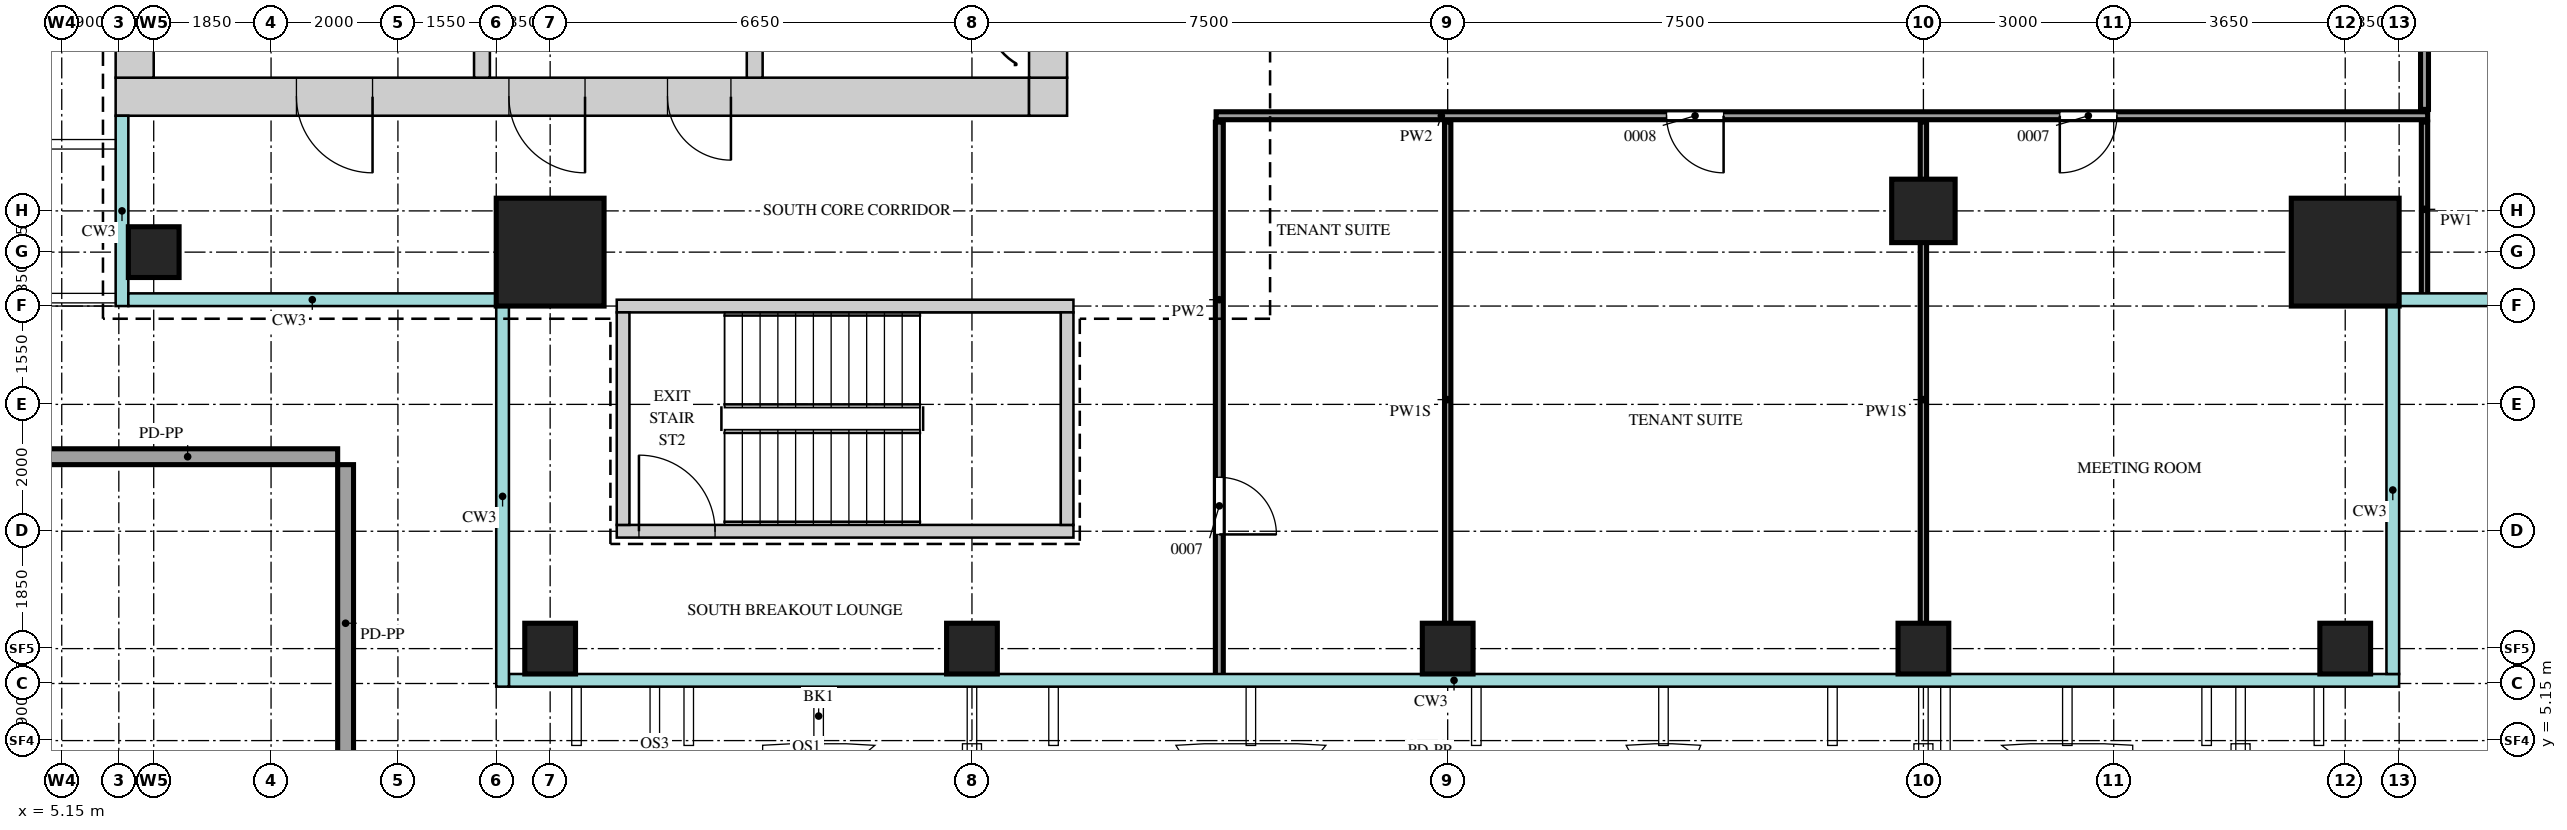
"""IFC4 building model, lengths in metres.
Left out: names, types, materials, properties, quantities, classifications, styles, units other than length and angle.
Written with IfcOpenShell. Run it as: python <this file> out.ifc"""

import sys

from ifc_helpers import new_model, si_unit, direction, frame, frame_2d, origin, origin_2d, place, context, subcontext, project, spatial, rectangle, extrude, source, transform, mapped, element, fill, save


model = new_model("IFC4")
c1 = context("Model", 3, precision=1e-05, world=origin(), true_north=direction((0.0, 1.0)))
c2 = subcontext(c1, "Body", "Model", "MODEL_VIEW")
j1 = project(units=[si_unit("LENGTHUNIT", "METRE"), si_unit("PLANEANGLEUNIT", "RADIAN")], contexts=[c1])
p1 = place(None, origin())
s1 = spatial("IfcSite", under=j1, at=p1, CompositionType="ELEMENT")
p2 = place(p1, origin())
s2 = spatial("IfcBuilding", under=s1, at=p2, CompositionType="ELEMENT")
p3 = place(p2, frame((0.0, 0.0, 282.2)))
s3 = spatial("IfcBuildingStorey", under=s2, at=p3, CompositionType="ELEMENT", Elevation=282.2)
m1 = source(origin(), c2, "Body", "SweptSolid", [
    extrude(rectangle(XDim=14.4, YDim=0.6, at=frame_2d((7.2, 0.0))), origin(), (0.0, 0.0, 1.0), 3.75),
])
p4 = place(p3, frame((6.0, 15.3, 0.0), z_axis=(0.0, 0.0, 1.0), x_axis=(1.0, 0.0, 0.0)))
e1 = element("IfcWall", 1, at=p4, inside=s3, PredefinedType="SHEAR", context=c2, shape_type="MappedRepresentation", body=[
    mapped(m1, transform((0.0, 0.0, 0.0))),
])
m2 = source(origin(), c2, "Body", "SweptSolid", [
    extrude(rectangle(XDim=1.2, YDim=2.1, at=frame_2d((0.6, 1.05))), frame((0.0, 0.31, 0.0), z_axis=(0.0, -1.0, 0.0), x_axis=(1.0, 0.0, 0.0)), (0.0, 0.0, 1.0), 0.62),
])
p5 = place(p4, frame((6.2, 0.0, 0.0)))
e2 = element("IfcOpeningElement", 2, at=p5, cuts=e1, PredefinedType="OPENING", context=c2, shape_type="MappedRepresentation", body=[
    mapped(m2, transform((0.0, 0.0, 0.0))),
])
p6 = place(p4, frame((2.85, 0.0, 0.0)))
e3 = element("IfcOpeningElement", 3, at=p6, cuts=e1, PredefinedType="OPENING", context=c2, shape_type="MappedRepresentation", body=[
    mapped(m2, transform((0.0, 0.0, 0.0))),
])
m3 = source(origin(), c2, "Body", "SweptSolid", [
    extrude(rectangle(XDim=1.0, YDim=2.1, at=frame_2d((0.5, 1.05))), frame((0.0, 0.31, 0.0), z_axis=(0.0, -1.0, 0.0), x_axis=(1.0, 0.0, 0.0)), (0.0, 0.0, 1.0), 0.62),
])
p7 = place(p4, frame((8.7, 0.0, 0.0)))
e4 = element("IfcOpeningElement", 4, at=p7, cuts=e1, PredefinedType="OPENING", context=c2, shape_type="MappedRepresentation", body=[
    mapped(m3, transform((0.0, 0.0, 0.0))),
])
m4 = source(origin(), c2, "Body", "SweptSolid", [
    extrude(rectangle(XDim=0.6, YDim=0.6, at=frame_2d((0.3, 0.0))), origin(), (0.0, 0.0, 1.0), 3.75),
])
p8 = place(p3, frame((20.4, 15.3, 0.0), z_axis=(0.0, 0.0, 1.0), x_axis=(1.0, 0.0, 0.0)))
e5 = element("IfcWall", 5, at=p8, inside=s3, PredefinedType="SHEAR", context=c2, shape_type="MappedRepresentation", body=[
    mapped(m4, transform((0.0, 0.0, 0.0))),
])
m5 = source(origin(), c2, "Body", "SweptSolid", [
    extrude(rectangle(XDim=22.8, YDim=0.6, at=frame_2d((11.4, 0.0))), origin(), (0.0, 0.0, 1.0), 3.75),
])
p9 = place(p3, frame((20.7, 15.6, 0.0), z_axis=(0.0, 0.0, 1.0), x_axis=(0.0, 1.0, 0.0)))
e6 = element("IfcWall", 6, at=p9, inside=s3, PredefinedType="SHEAR", context=c2, shape_type="MappedRepresentation", body=[
    mapped(m5, transform((0.0, 0.0, 0.0))),
])
m6 = source(origin(), c2, "Body", "SweptSolid", [
    extrude(rectangle(XDim=1.8, YDim=2.1, at=frame_2d((0.9, 1.05))), frame((0.0, 0.31, 0.0), z_axis=(0.0, -1.0, 0.0), x_axis=(1.0, 0.0, 0.0)), (0.0, 0.0, 1.0), 0.62),
])
p10 = place(p9, frame((10.9, 0.0, 0.0)))
e7 = element("IfcOpeningElement", 7, at=p10, cuts=e6, PredefinedType="OPENING", context=c2, shape_type="MappedRepresentation", body=[
    mapped(m6, transform((0.0, 0.0, 0.0))),
])
m7 = source(origin(), c2, "Body", "SweptSolid", [
    extrude(rectangle(XDim=0.9, YDim=2.1, at=frame_2d((0.45, 1.05))), frame((0.0, 0.31, 0.0), z_axis=(0.0, -1.0, 0.0), x_axis=(1.0, 0.0, 0.0)), (0.0, 0.0, 1.0), 0.62),
])
p11 = place(p9, frame((0.55, 0.0, 0.0)))
e8 = element("IfcOpeningElement", 8, at=p11, cuts=e6, PredefinedType="OPENING", context=c2, shape_type="MappedRepresentation", body=[
    mapped(m7, transform((0.0, 0.0, 0.0))),
])
p12 = place(p9, frame((2.3, 0.0, 0.0)))
e9 = element("IfcOpeningElement", 9, at=p12, cuts=e6, PredefinedType="OPENING", context=c2, shape_type="MappedRepresentation", body=[
    mapped(m3, transform((0.0, 0.0, 0.0))),
])
p13 = place(p9, frame((5.1, 0.0, 0.0)))
e10 = element("IfcOpeningElement", 10, at=p13, cuts=e6, PredefinedType="OPENING", context=c2, shape_type="MappedRepresentation", body=[
    mapped(m7, transform((0.0, 0.0, 0.0))),
])
p14 = place(p3, frame((6.3, 15.6, 0.0), z_axis=(0.0, 0.0, 1.0), x_axis=(0.0, 1.0, 0.0)))
e11 = element("IfcWall", 11, at=p14, inside=s3, PredefinedType="SHEAR", context=c2, shape_type="MappedRepresentation", body=[
    mapped(m5, transform((0.0, 0.0, 0.0))),
])
m8 = source(origin(), c2, "Body", "SweptSolid", [
    extrude(rectangle(XDim=7.2, YDim=0.2, at=frame_2d((3.6, 0.0))), origin(), (0.0, 0.0, 1.0), 3.75),
])
p15 = place(p3, frame((13.9, 12.0, 0.0), z_axis=(0.0, 0.0, 1.0), x_axis=(1.0, 0.0, 0.0)))
e12 = element("IfcWall", 12, at=p15, inside=s3, PredefinedType="SHEAR", context=c2, shape_type="MappedRepresentation", body=[
    mapped(m8, transform((0.0, 0.0, 0.0))),
])
p16 = place(p3, frame((13.9, 8.45, 0.0), z_axis=(0.0, 0.0, 1.0), x_axis=(1.0, 0.0, 0.0)))
e13 = element("IfcWall", 13, at=p16, inside=s3, PredefinedType="SHEAR", context=c2, shape_type="MappedRepresentation", body=[
    mapped(m8, transform((0.0, 0.0, 0.0))),
])
m9 = source(origin(), c2, "Body", "SweptSolid", [
    extrude(rectangle(XDim=1.2, YDim=2.1, at=frame_2d((0.6, 1.05))), frame((0.0, 0.11, 0.0), z_axis=(0.0, -1.0, 0.0), x_axis=(1.0, 0.0, 0.0)), (0.0, 0.0, 1.0), 0.22),
])
p17 = place(p16, frame((0.35, 0.0, 0.0)))
e14 = element("IfcOpeningElement", 14, at=p17, cuts=e13, PredefinedType="OPENING", context=c2, shape_type="MappedRepresentation", body=[
    mapped(m9, transform((0.0, 0.0, 0.0))),
])
m10 = source(origin(), c2, "Body", "SweptSolid", [
    extrude(rectangle(XDim=3.35, YDim=0.2, at=frame_2d((1.675, 0.0))), origin(), (0.0, 0.0, 1.0), 3.75),
])
for number, where, z_axis, x_axis in (
    (15, (21.0, 8.55, 0.0), (0.0, 0.0, 1.0), (0.0, 1.0, 0.0)),
    (16, (14.0, 8.55, 0.0), (0.0, 0.0, 1.0), (0.0, 1.0, 0.0)),
):
    element("IfcWall", number, at=place(p3, frame(where, z_axis=z_axis, x_axis=x_axis)), inside=s3, PredefinedType="SHEAR", context=c2, shape_type="MappedRepresentation", body=[
        mapped(m10, transform((0.0, 0.0, 0.0))),
    ])
m11 = source(origin(), c2, "Body", "SweptSolid", [
    extrude(rectangle(XDim=3.6, YDim=0.25, at=frame_2d((1.8, 0.0))), origin(), (0.0, 0.0, 1.0), 3.75),
])
for number, where, z_axis, x_axis in (
    (17, (16.075, 15.6, 0.0), (0.0, 0.0, 1.0), (0.0, 1.0, 0.0)),
    (18, (11.775, 15.6, 0.0), (0.0, 0.0, 1.0), (0.0, 1.0, 0.0)),
):
    element("IfcWall", number, at=place(p3, frame(where, z_axis=z_axis, x_axis=x_axis)), inside=s3, PredefinedType="STANDARD", context=c2, shape_type="MappedRepresentation", body=[
        mapped(m11, transform((0.0, 0.0, 0.0))),
    ])
m12 = source(origin(), c2, "Body", "SweptSolid", [
    extrude(rectangle(XDim=1.7, YDim=1.7, at=origin_2d()), origin(), (0.0, 0.0, 1.0), 3.75),
])
for number, where, z_axis, x_axis in (
    (19, (41.15, 12.85, 0.0), (0.0, 0.0, 1.0), (1.0, 0.0, 0.0)),
    (20, (12.85, 12.85, 0.0), (0.0, 0.0, 1.0), (1.0, 0.0, 0.0)),
):
    element("IfcColumn", number, at=place(p3, frame(where, z_axis=z_axis, x_axis=x_axis)), inside=s3, PredefinedType="COLUMN", context=c2, shape_type="MappedRepresentation", body=[
        mapped(m12, transform((0.0, 0.0, 0.0))),
    ])
m13 = source(origin(), c2, "Body", "SweptSolid", [
    extrude(rectangle(XDim=0.8, YDim=0.8, at=origin_2d()), origin(), (0.0, 0.0, 1.0), 3.75),
])
for number, where, z_axis, x_axis in (
    (21, (12.85, 6.6, 0.0), (0.0, 0.0, 1.0), (1.0, 0.0, 0.0)),
    (22, (19.5, 6.6, 0.0), (0.0, 0.0, 1.0), (1.0, 0.0, 0.0)),
    (23, (27.0, 6.6, 0.0), (0.0, 0.0, 1.0), (1.0, 0.0, 0.0)),
    (24, (34.5, 6.6, 0.0), (0.0, 0.0, 1.0), (1.0, 0.0, 0.0)),
    (25, (41.15, 6.6, 0.0), (0.0, 0.0, 1.0), (1.0, 0.0, 0.0)),
    (26, (6.6, 12.85, 0.0), (0.0, 0.0, 1.0), (1.0, 0.0, 0.0)),
):
    element("IfcColumn", number, at=place(p3, frame(where, z_axis=z_axis, x_axis=x_axis)), inside=s3, PredefinedType="COLUMN", context=c2, shape_type="MappedRepresentation", body=[
        mapped(m13, transform((0.0, 0.0, 0.0))),
    ])
m14 = source(origin(), c2, "Body", "SweptSolid", [
    extrude(rectangle(XDim=1.0, YDim=1.0, at=origin_2d()), origin(), (0.0, 0.0, 1.0), 3.75),
])
p18 = place(p3, frame((34.5, 13.5, 0.0), z_axis=(0.0, 0.0, 1.0), x_axis=(1.0, 0.0, 0.0)))
e27 = element("IfcColumn", 27, at=p18, inside=s3, PredefinedType="COLUMN", context=c2, shape_type="MappedRepresentation", body=[
    mapped(m14, transform((0.0, 0.0, 0.0))),
])
m15 = source(origin(), c2, "Body", "SweptSolid", [
    extrude(rectangle(XDim=5.0, YDim=0.25, at=frame_2d((2.5, 0.0))), origin(), (0.0, 0.0, 1.0), 1.1),
])
p19 = place(p3, frame((9.625, 9.5, 0.0), z_axis=(0.0, 0.0, 1.0), x_axis=(0.0, -1.0, 0.0)))
e28 = element("IfcWall", 28, at=p19, inside=s3, PredefinedType="SOLIDWALL", context=c2, shape_type="MappedRepresentation", body=[
    mapped(m15, transform((0.0, 0.0, 0.0))),
])
m16 = source(origin(), c2, "Body", "SweptSolid", [
    extrude(rectangle(XDim=4.73, YDim=0.25, at=frame_2d((2.365, 0.0))), origin(), (0.0, 0.0, 1.0), 1.1),
])
p20 = place(p3, frame((4.77, 9.625, 0.0), z_axis=(0.0, 0.0, 1.0), x_axis=(1.0, 0.0, 0.0)))
e29 = element("IfcWall", 29, at=p20, inside=s3, PredefinedType="SOLIDWALL", context=c2, shape_type="MappedRepresentation", body=[
    mapped(m16, transform((0.0, 0.0, 0.0))),
])
m17 = source(origin(), c2, "Body", "SweptSolid", [
    extrude(rectangle(XDim=8.75, YDim=0.125, at=frame_2d((4.375, 0.0))), origin(), (0.0, 0.0, 1.0), 3.8),
])
p21 = place(p3, frame((23.4, 6.15, 0.0), z_axis=(0.0, 0.0, 1.0), x_axis=(0.0, 1.0, 0.0)))
e30 = element("IfcWall", 30, at=p21, inside=s3, PredefinedType="PARTITIONING", context=c2, shape_type="MappedRepresentation", body=[
    mapped(m17, transform((0.0, 0.0, 0.0))),
])
m18 = source(origin(), c2, "Body", "SweptSolid", [
    extrude(rectangle(XDim=0.9, YDim=2.1, at=frame_2d((0.45, 1.05))), frame((0.0, 0.073, 0.0), z_axis=(0.0, -1.0, 0.0), x_axis=(1.0, 0.0, 0.0)), (0.0, 0.0, 1.0), 0.145),
])
p22 = place(p21, frame((2.25, 0.0, 0.0)))
e31 = element("IfcOpeningElement", 31, at=p22, cuts=e30, PredefinedType="OPENING", context=c2, shape_type="MappedRepresentation", body=[
    mapped(m18, transform((0.0, 0.0, 0.0))),
])
m19 = source(origin(), c2, "Body", "SweptSolid", [
    extrude(rectangle(XDim=8.75, YDim=0.1, at=frame_2d((4.375, 0.0))), origin(), (0.0, 0.0, 1.0), 3.35),
])
for number, where, z_axis, x_axis in (
    (32, (27.0, 6.15, 0.0), (0.0, 0.0, 1.0), (0.0, 1.0, 0.0)),
    (33, (34.5, 6.15, 0.0), (0.0, 0.0, 1.0), (0.0, 1.0, 0.0)),
):
    element("IfcWall", number, at=place(p3, frame(where, z_axis=z_axis, x_axis=x_axis)), inside=s3, PredefinedType="PARTITIONING", context=c2, shape_type="MappedRepresentation", body=[
        mapped(m19, transform((0.0, 0.0, 0.0))),
    ])
m20 = source(origin(), c2, "Body", "SweptSolid", [
    extrude(rectangle(XDim=2.75, YDim=0.1, at=frame_2d((1.375, 0.0))), origin(), (0.0, 0.0, 1.0), 3.8),
])
p23 = place(p3, frame((42.4, 12.15, 0.0), z_axis=(0.0, 0.0, 1.0), x_axis=(0.0, 1.0, 0.0)))
e34 = element("IfcWall", 34, at=p23, inside=s3, PredefinedType="PARTITIONING", context=c2, shape_type="MappedRepresentation", body=[
    mapped(m20, transform((0.0, 0.0, 0.0))),
])
m21 = source(origin(), c2, "Body", "SweptSolid", [
    extrude(rectangle(XDim=19.1, YDim=0.125, at=frame_2d((9.55, 0.0))), origin(), (0.0, 0.0, 1.0), 3.8),
])
p24 = place(p3, frame((23.35, 15.0, 0.0), z_axis=(0.0, 0.0, 1.0), x_axis=(1.0, 0.0, 0.0)))
e35 = element("IfcWall", 35, at=p24, inside=s3, PredefinedType="PARTITIONING", context=c2, shape_type="MappedRepresentation", body=[
    mapped(m21, transform((0.0, 0.0, 0.0))),
])
p25 = place(p24, frame((7.1, 0.0, 0.0)))
e36 = element("IfcOpeningElement", 36, at=p25, cuts=e35, PredefinedType="OPENING", context=c2, shape_type="MappedRepresentation", body=[
    mapped(m18, transform((0.0, 0.0, 0.0))),
])
p26 = place(p24, frame((13.3, 0.0, 0.0)))
e37 = element("IfcOpeningElement", 37, at=p26, cuts=e35, PredefinedType="OPENING", context=c2, shape_type="MappedRepresentation", body=[
    mapped(m18, transform((0.0, 0.0, 0.0))),
])
m22 = source(origin(), c2, "Body", "SweptSolid", [
    extrude(rectangle(XDim=23.8, YDim=0.125, at=frame_2d((11.9, 0.0))), origin(), (0.0, 0.0, 1.0), 3.8),
])
p27 = place(p3, frame((42.4, 15.1, 0.0), z_axis=(0.0, 0.0, 1.0), x_axis=(0.0, 1.0, 0.0)))
e38 = element("IfcWall", 38, at=p27, inside=s3, PredefinedType="PARTITIONING", context=c2, shape_type="MappedRepresentation", body=[
    mapped(m22, transform((0.0, 0.0, 0.0))),
])
p28 = place(p27, frame((5.3, 0.0, 0.0)))
e39 = element("IfcOpeningElement", 39, at=p28, cuts=e38, PredefinedType="OPENING", context=c2, shape_type="MappedRepresentation", body=[
    mapped(m18, transform((0.0, 0.0, 0.0))),
])
p29 = place(p27, frame((15.35, 0.0, 0.0)))
e40 = element("IfcOpeningElement", 40, at=p29, cuts=e38, PredefinedType="OPENING", context=c2, shape_type="MappedRepresentation", body=[
    mapped(m18, transform((0.0, 0.0, 0.0))),
])
p30 = place(p27, frame((21.05, 0.0, 0.0)))
e41 = element("IfcOpeningElement", 41, at=p30, cuts=e38, PredefinedType="OPENING", context=c2, shape_type="MappedRepresentation", body=[
    mapped(m18, transform((0.0, 0.0, 0.0))),
])
m23 = source(origin(), c2, "Body", "SweptSolid", [
    extrude(rectangle(XDim=1.2, YDim=2.1, at=frame_2d((0.6, 1.05))), frame((0.0, 0.25, 0.0), z_axis=(0.0, -1.0, 0.0), x_axis=(1.0, 0.0, 0.0)), (0.0, 0.0, 1.0), 0.5),
])
p31 = place(p5, origin())
e42 = element("IfcDoor", 42, at=p31, inside=s3, OperationType="SINGLE_SWING_RIGHT", PredefinedType="DOOR", context=c2, shape_type="MappedRepresentation", body=[
    mapped(m23, transform((0.0, 0.0, 0.0))),
])
fill(e2, e42)
p32 = place(p6, origin())
e43 = element("IfcDoor", 43, at=p32, inside=s3, OperationType="SINGLE_SWING_RIGHT", PredefinedType="DOOR", context=c2, shape_type="MappedRepresentation", body=[
    mapped(m23, transform((0.0, 0.0, 0.0))),
])
fill(e3, e43)
m24 = source(origin(), c2, "Body", "SweptSolid", [
    extrude(rectangle(XDim=1.0, YDim=2.1, at=frame_2d((0.5, 1.05))), frame((0.0, 0.25, 0.0), z_axis=(0.0, -1.0, 0.0), x_axis=(1.0, 0.0, 0.0)), (0.0, 0.0, 1.0), 0.5),
])
p33 = place(p7, origin())
e44 = element("IfcDoor", 44, at=p33, inside=s3, OperationType="SINGLE_SWING_RIGHT", PredefinedType="DOOR", context=c2, shape_type="MappedRepresentation", body=[
    mapped(m24, transform((0.0, 0.0, 0.0))),
])
fill(e4, e44)
m25 = source(origin(), c2, "Body", "SweptSolid", [
    extrude(rectangle(XDim=0.9, YDim=2.1, at=frame_2d((0.45, 1.05))), frame((0.0, 0.025, 0.0), z_axis=(0.0, -1.0, 0.0), x_axis=(1.0, 0.0, 0.0)), (0.0, 0.0, 1.0), 0.05),
])
p34 = place(p22, origin())
e45 = element("IfcDoor", 45, at=p34, inside=s3, OperationType="SINGLE_SWING_LEFT", PredefinedType="DOOR", context=c2, shape_type="MappedRepresentation", body=[
    mapped(m25, transform((0.0, 0.0, 0.0))),
])
fill(e31, e45)
p35 = place(p25, origin())
e46 = element("IfcDoor", 46, at=p35, inside=s3, OperationType="SINGLE_SWING_RIGHT", PredefinedType="DOOR", context=c2, shape_type="MappedRepresentation", body=[
    mapped(m25, transform((0.0, 0.0, 0.0))),
])
fill(e36, e46)
p36 = place(p26, origin())
e47 = element("IfcDoor", 47, at=p36, inside=s3, OperationType="SINGLE_SWING_LEFT", PredefinedType="DOOR", context=c2, shape_type="MappedRepresentation", body=[
    mapped(m25, transform((0.0, 0.0, 0.0))),
])
fill(e37, e47)
m26 = source(origin(), c2, "Body", "SweptSolid", [
    extrude(rectangle(XDim=1.2, YDim=2.1, at=frame_2d((0.6, 1.05))), frame((0.0, 0.025, 0.0), z_axis=(0.0, -1.0, 0.0), x_axis=(1.0, 0.0, 0.0)), (0.0, 0.0, 1.0), 0.05),
])
p37 = place(p17, origin())
e48 = element("IfcDoor", 48, at=p37, inside=s3, OperationType="SINGLE_SWING_RIGHT", PredefinedType="DOOR", context=c2, shape_type="MappedRepresentation", body=[
    mapped(m26, transform((0.0, 0.0, 0.0))),
])
fill(e14, e48)
save(model, sys.argv[1])
